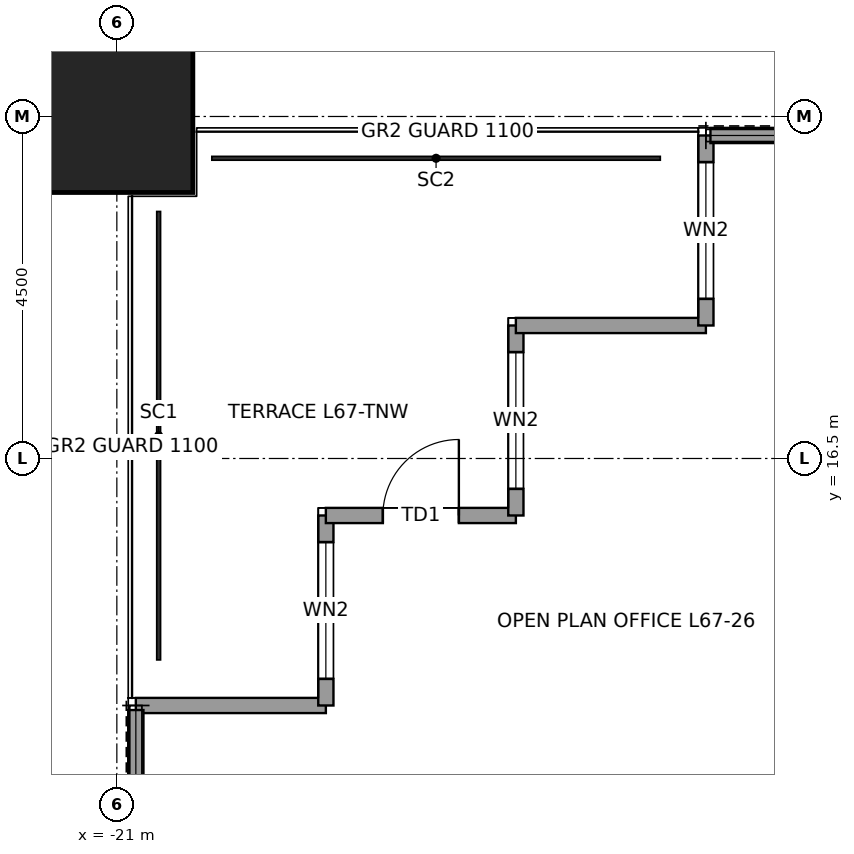
"""IFC4 building model, lengths in metres.
Left out: names, types, materials, properties, quantities, classifications, styles, units other than length and angle.
Written with IfcOpenShell. Run it as: python <this file> out.ifc"""

import sys

from ifc_helpers import new_model, si_unit, direction, frame, frame_2d, origin, origin_2d, place, context, subcontext, project, spatial, rectangle, hollow_rectangle, extrude, element, fill, save


model = new_model("IFC4")
c1 = context("Model", 3, precision=1e-05, world=origin(), true_north=direction((0.0, 1.0)))
c2 = subcontext(c1, "Body", "Model", "MODEL_VIEW")
j1 = project(units=[si_unit("LENGTHUNIT", "METRE"), si_unit("PLANEANGLEUNIT", "RADIAN")], contexts=[c1])
p1 = place(None, origin())
s1 = spatial("IfcSite", under=j1, at=p1, CompositionType="ELEMENT")
p2 = place(p1, origin())
s2 = spatial("IfcBuilding", under=s1, at=p2, CompositionType="ELEMENT")
p3 = place(p2, frame((0.0, 0.0, 303.9)))
s3 = spatial("IfcBuildingStorey", under=s2, at=p3, CompositionType="ELEMENT", Elevation=303.9)
p4 = place(p3, frame((-21.0, 21.0, 0.0), z_axis=(0.0, 0.0, 1.0), x_axis=(1.0, 0.0, 0.0)))
e1 = element("IfcColumn", 1, at=p4, inside=s3, PredefinedType="COLUMN", context=c2, shape_type="SweptSolid", body=[
    extrude(hollow_rectangle(XDim=2.0, YDim=2.0, WallThickness=0.095, at=origin_2d()), origin(), (0.0, 0.0, 1.0), 4.0),
])
p5 = place(p3, frame((-20.75, 13.25, 0.0), z_axis=(0.0, 0.0, 1.0), x_axis=(1.0, 0.0, 0.0)))
e2 = element("IfcWall", 2, at=p5, inside=s3, PredefinedType="SOLIDWALL", context=c2, shape_type="SweptSolid", body=[
    extrude(rectangle(XDim=2.5, YDim=0.2, at=frame_2d((1.25, 0.0))), origin(), (0.0, 0.0, 1.0), 3.85),
])
p6 = place(p3, frame((-18.25, 13.25, 0.0), z_axis=(0.0, 0.0, 1.0), x_axis=(0.0, 1.0, 0.0)))
e3 = element("IfcWall", 3, at=p6, inside=s3, PredefinedType="SOLIDWALL", context=c2, shape_type="SweptSolid", body=[
    extrude(rectangle(XDim=2.5, YDim=0.2, at=frame_2d((1.25, 0.0))), origin(), (0.0, 0.0, 1.0), 3.85),
])
p7 = place(p6, frame((0.35, 0.0, 0.3)))
e4 = element("IfcOpeningElement", 4, at=p7, cuts=e3, PredefinedType="OPENING", context=c2, shape_type="SweptSolid", body=[
    extrude(rectangle(XDim=1.8, YDim=2.4, at=frame_2d((0.9, 1.2))), frame((0.0, 0.11, 0.0), z_axis=(0.0, -1.0, 0.0), x_axis=(1.0, 0.0, 0.0)), (0.0, 0.0, 1.0), 0.22),
])
p8 = place(p3, frame((-18.25, 15.75, 0.0), z_axis=(0.0, 0.0, 1.0), x_axis=(1.0, 0.0, 0.0)))
e5 = element("IfcWall", 5, at=p8, inside=s3, PredefinedType="SOLIDWALL", context=c2, shape_type="SweptSolid", body=[
    extrude(rectangle(XDim=2.5, YDim=0.2, at=frame_2d((1.25, 0.0))), origin(), (0.0, 0.0, 1.0), 3.317),
])
p9 = place(p8, frame((0.75, 0.0, 0.0)))
e6 = element("IfcOpeningElement", 6, at=p9, cuts=e5, PredefinedType="OPENING", context=c2, shape_type="SweptSolid", body=[
    extrude(rectangle(XDim=1.0, YDim=2.4, at=frame_2d((0.5, 1.2))), frame((0.0, 0.11, 0.0), z_axis=(0.0, -1.0, 0.0), x_axis=(1.0, 0.0, 0.0)), (0.0, 0.0, 1.0), 0.22),
])
p10 = place(p3, frame((-15.75, 15.75, 0.0), z_axis=(0.0, 0.0, 1.0), x_axis=(0.0, 1.0, 0.0)))
e7 = element("IfcWall", 7, at=p10, inside=s3, PredefinedType="SOLIDWALL", context=c2, shape_type="SweptSolid", body=[
    extrude(rectangle(XDim=2.5, YDim=0.2, at=frame_2d((1.25, 0.0))), origin(), (0.0, 0.0, 1.0), 3.85),
])
p11 = place(p10, frame((0.35, 0.0, 0.3)))
e8 = element("IfcOpeningElement", 8, at=p11, cuts=e7, PredefinedType="OPENING", context=c2, shape_type="SweptSolid", body=[
    extrude(rectangle(XDim=1.8, YDim=2.4, at=frame_2d((0.9, 1.2))), frame((0.0, 0.11, 0.0), z_axis=(0.0, -1.0, 0.0), x_axis=(1.0, 0.0, 0.0)), (0.0, 0.0, 1.0), 0.22),
])
p12 = place(p3, frame((-15.75, 18.25, 0.0), z_axis=(0.0, 0.0, 1.0), x_axis=(1.0, 0.0, 0.0)))
e9 = element("IfcWall", 9, at=p12, inside=s3, PredefinedType="SOLIDWALL", context=c2, shape_type="SweptSolid", body=[
    extrude(rectangle(XDim=2.5, YDim=0.2, at=frame_2d((1.25, 0.0))), origin(), (0.0, 0.0, 1.0), 3.85),
])
p13 = place(p3, frame((-13.25, 18.25, 0.0), z_axis=(0.0, 0.0, 1.0), x_axis=(0.0, 1.0, 0.0)))
e10 = element("IfcWall", 10, at=p13, inside=s3, PredefinedType="SOLIDWALL", context=c2, shape_type="SweptSolid", body=[
    extrude(rectangle(XDim=2.5, YDim=0.2, at=frame_2d((1.25, 0.0))), origin(), (0.0, 0.0, 1.0), 3.85),
])
p14 = place(p13, frame((0.35, 0.0, 0.3)))
e11 = element("IfcOpeningElement", 11, at=p14, cuts=e10, PredefinedType="OPENING", context=c2, shape_type="SweptSolid", body=[
    extrude(rectangle(XDim=1.8, YDim=2.4, at=frame_2d((0.9, 1.2))), frame((0.0, 0.11, 0.0), z_axis=(0.0, -1.0, 0.0), x_axis=(1.0, 0.0, 0.0)), (0.0, 0.0, 1.0), 0.22),
])
for number, where, z_axis, x_axis in (
    (12, (-13.19, 20.75, 0.0), (0.0, 0.0, 1.0), (1.0, 0.0, 0.0)),
    (13, (-20.75, 10.405, 0.0), (0.0, 0.0, 1.0), (0.0, 1.0, 0.0)),
):
    element("IfcWall", number, at=place(p3, frame(where, z_axis=z_axis, x_axis=x_axis)), inside=s3, PredefinedType="SOLIDWALL", context=c2, shape_type="SweptSolid", body=[
        extrude(rectangle(XDim=2.785, YDim=0.2, at=frame_2d((1.393, 0.0))), origin(), (0.0, 0.0, 1.0), 3.85),
    ])
p15 = place(p7, origin())
e14 = element("IfcWindow", 14, at=p15, inside=s3, PartitioningType="SINGLE_PANEL", PredefinedType="WINDOW", context=c2, shape_type="SweptSolid", body=[
    extrude(rectangle(XDim=1.8, YDim=2.4, at=frame_2d((0.9, 1.2))), frame((0.0, 0.03, 0.0), z_axis=(0.0, -1.0, 0.0), x_axis=(1.0, 0.0, 0.0)), (0.0, 0.0, 1.0), 0.06),
])
fill(e4, e14)
p16 = place(p9, origin())
e15 = element("IfcDoor", 15, at=p16, inside=s3, OperationType="SINGLE_SWING_RIGHT", PredefinedType="DOOR", context=c2, shape_type="SweptSolid", body=[
    extrude(rectangle(XDim=1.0, YDim=2.4, at=frame_2d((0.5, 1.2))), frame((0.0, 0.025, 0.0), z_axis=(0.0, -1.0, 0.0), x_axis=(1.0, 0.0, 0.0)), (0.0, 0.0, 1.0), 0.05),
])
fill(e6, e15)
p17 = place(p11, origin())
e16 = element("IfcWindow", 16, at=p17, inside=s3, PartitioningType="SINGLE_PANEL", PredefinedType="WINDOW", context=c2, shape_type="SweptSolid", body=[
    extrude(rectangle(XDim=1.8, YDim=2.4, at=frame_2d((0.9, 1.2))), frame((0.0, 0.03, 0.0), z_axis=(0.0, -1.0, 0.0), x_axis=(1.0, 0.0, 0.0)), (0.0, 0.0, 1.0), 0.06),
])
fill(e8, e16)
p18 = place(p14, origin())
e17 = element("IfcWindow", 17, at=p18, inside=s3, PartitioningType="SINGLE_PANEL", PredefinedType="WINDOW", context=c2, shape_type="SweptSolid", body=[
    extrude(rectangle(XDim=1.8, YDim=2.4, at=frame_2d((0.9, 1.2))), frame((0.0, 0.03, 0.0), z_axis=(0.0, -1.0, 0.0), x_axis=(1.0, 0.0, 0.0)), (0.0, 0.0, 1.0), 0.06),
])
fill(e11, e17)
save(model, sys.argv[1])
